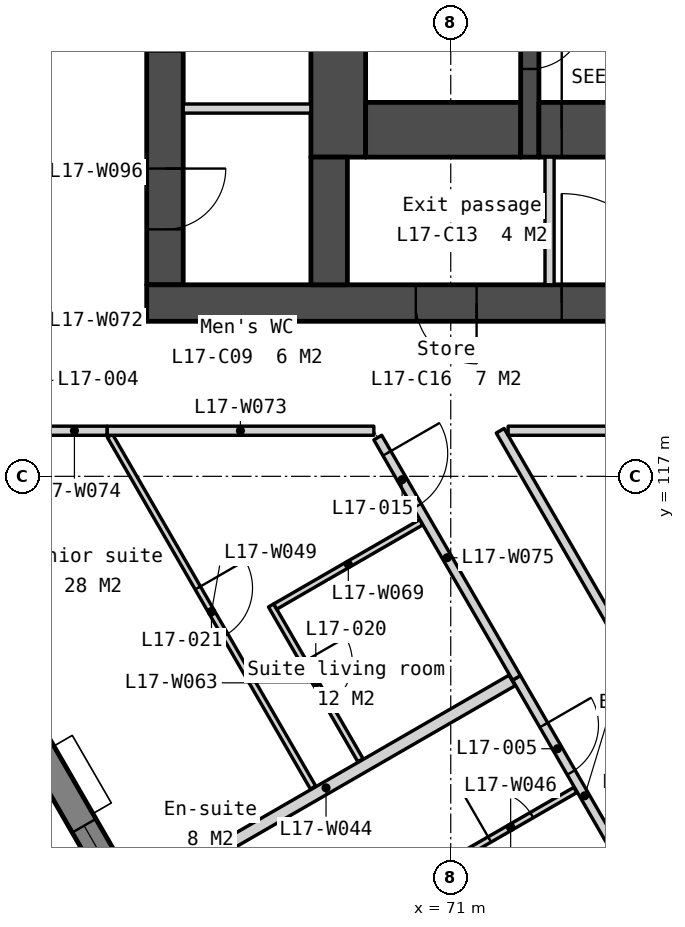
"""IFC4 building model, lengths in metres.
Left out: names, types, materials, properties, quantities, classifications, styles, units other than length and angle.
Written with IfcOpenShell. Run it as: python <this file> out.ifc"""

import sys

from ifc_helpers import new_model, si_unit, direction, frame, frame_2d, origin, place, context, subcontext, project, spatial, polyline, rectangle, outline, extrude, element, fill, save


model = new_model("IFC4")
c1 = context("Model", 3, precision=1e-05, world=origin(), true_north=direction((0.0, 1.0)))
c2 = subcontext(c1, "Body", "Model", "MODEL_VIEW")
j1 = project(units=[si_unit("LENGTHUNIT", "METRE"), si_unit("PLANEANGLEUNIT", "RADIAN")], contexts=[c1])
p1 = place(None, origin())
s1 = spatial("IfcSite", under=j1, at=p1, CompositionType="ELEMENT")
p2 = place(p1, origin())
s2 = spatial("IfcBuilding", under=s1, at=p2, CompositionType="ELEMENT")
p3 = place(p2, frame((0.0, 0.0, 73.5)))
s3 = spatial("IfcBuildingStorey", under=s2, at=p3, CompositionType="ELEMENT", Elevation=73.5)
p4 = place(p3, frame((66.3, 133.95, 0.0), z_axis=(0.0, 0.0, 1.0), x_axis=(0.0, -1.0, 0.0)))
e1 = element("IfcWall", 1, at=p4, inside=s3, PredefinedType="SOLIDWALL", context=c2, shape_type="SweptSolid", body=[
    extrude(rectangle(XDim=13.8, YDim=0.6, at=frame_2d((6.9, 0.0))), origin(), (0.0, 0.0, 1.0), 3.25),
])
p5 = place(p4, frame((0.6, 0.0, 0.0)))
e2 = element("IfcOpeningElement", 2, at=p5, cuts=e1, PredefinedType="OPENING", context=c2, shape_type="SweptSolid", body=[
    extrude(rectangle(XDim=1.1, YDim=2.1, at=frame_2d((0.55, 1.05))), frame((0.0, 0.31, 0.0), z_axis=(0.0, -1.0, 0.0), x_axis=(1.0, 0.0, 0.0)), (0.0, 0.0, 1.0), 0.62),
])
p6 = place(p4, frame((8.963, 0.0, 0.0)))
e3 = element("IfcOpeningElement", 3, at=p6, cuts=e1, PredefinedType="OPENING", context=c2, shape_type="SweptSolid", body=[
    extrude(rectangle(XDim=1.0, YDim=2.1, at=frame_2d((0.5, 1.05))), frame((0.0, 0.31, 0.0), z_axis=(0.0, -1.0, 0.0), x_axis=(1.0, 0.0, 0.0)), (0.0, 0.0, 1.0), 0.62),
])
p7 = place(p4, frame((11.888, 0.0, 0.0)))
e4 = element("IfcOpeningElement", 4, at=p7, cuts=e1, PredefinedType="OPENING", context=c2, shape_type="SweptSolid", body=[
    extrude(rectangle(XDim=1.0, YDim=2.1, at=frame_2d((0.5, 1.05))), frame((0.0, 0.31, 0.0), z_axis=(0.0, -1.0, 0.0), x_axis=(1.0, 0.0, 0.0)), (0.0, 0.0, 1.0), 0.62),
])
p8 = place(p3, frame((66.0, 119.85, 0.0), z_axis=(0.0, 0.0, 1.0), x_axis=(1.0, 0.0, 0.0)))
e5 = element("IfcWall", 5, at=p8, inside=s3, PredefinedType="SOLIDWALL", context=c2, shape_type="SweptSolid", body=[
    extrude(rectangle(XDim=28.0, YDim=0.6, at=frame_2d((14.0, 0.0))), origin(), (0.0, 0.0, 1.0), 3.25),
])
p9 = place(p8, frame((6.825, 0.0, 0.0)))
e6 = element("IfcOpeningElement", 6, at=p9, cuts=e5, PredefinedType="OPENING", context=c2, shape_type="SweptSolid", body=[
    extrude(rectangle(XDim=1.8, YDim=2.1, at=frame_2d((0.9, 1.05))), frame((0.0, 0.31, 0.0), z_axis=(0.0, -1.0, 0.0), x_axis=(1.0, 0.0, 0.0)), (0.0, 0.0, 1.0), 0.62),
])
p10 = place(p8, frame((15.85, 0.0, 0.0)))
e7 = element("IfcOpeningElement", 7, at=p10, cuts=e5, PredefinedType="OPENING", context=c2, shape_type="SweptSolid", body=[
    extrude(rectangle(XDim=1.5, YDim=2.1, at=frame_2d((0.75, 1.05))), frame((0.0, 0.31, 0.0), z_axis=(0.0, -1.0, 0.0), x_axis=(1.0, 0.0, 0.0)), (0.0, 0.0, 1.0), 0.62),
])
p11 = place(p8, frame((19.375, 0.0, 0.0)))
e8 = element("IfcOpeningElement", 8, at=p11, cuts=e5, PredefinedType="OPENING", context=c2, shape_type="SweptSolid", body=[
    extrude(rectangle(XDim=1.8, YDim=2.1, at=frame_2d((0.9, 1.05))), frame((0.0, 0.31, 0.0), z_axis=(0.0, -1.0, 0.0), x_axis=(1.0, 0.0, 0.0)), (0.0, 0.0, 1.0), 0.62),
])
p12 = place(p8, frame((4.425, 0.0, 0.0)))
e9 = element("IfcOpeningElement", 9, at=p12, cuts=e5, PredefinedType="OPENING", context=c2, shape_type="SweptSolid", body=[
    extrude(rectangle(XDim=1.0, YDim=2.1, at=frame_2d((0.5, 1.05))), frame((0.0, 0.31, 0.0), z_axis=(0.0, -1.0, 0.0), x_axis=(1.0, 0.0, 0.0)), (0.0, 0.0, 1.0), 0.62),
])
p13 = place(p8, frame((9.783, 0.0, 0.0)))
e10 = element("IfcOpeningElement", 10, at=p13, cuts=e5, PredefinedType="OPENING", context=c2, shape_type="SweptSolid", body=[
    extrude(rectangle(XDim=1.0, YDim=2.1, at=frame_2d((0.5, 1.05))), frame((0.0, 0.31, 0.0), z_axis=(0.0, -1.0, 0.0), x_axis=(1.0, 0.0, 0.0)), (0.0, 0.0, 1.0), 0.62),
])
p14 = place(p8, frame((11.525, 0.0, 0.0)))
e11 = element("IfcOpeningElement", 11, at=p14, cuts=e5, PredefinedType="OPENING", context=c2, shape_type="SweptSolid", body=[
    extrude(rectangle(XDim=1.0, YDim=2.1, at=frame_2d((0.5, 1.05))), frame((0.0, 0.31, 0.0), z_axis=(0.0, -1.0, 0.0), x_axis=(1.0, 0.0, 0.0)), (0.0, 0.0, 1.0), 0.62),
])
p15 = place(p8, frame((13.658, 0.0, 0.0)))
e12 = element("IfcOpeningElement", 12, at=p15, cuts=e5, PredefinedType="OPENING", context=c2, shape_type="SweptSolid", body=[
    extrude(rectangle(XDim=1.0, YDim=2.1, at=frame_2d((0.5, 1.05))), frame((0.0, 0.31, 0.0), z_axis=(0.0, -1.0, 0.0), x_axis=(1.0, 0.0, 0.0)), (0.0, 0.0, 1.0), 0.62),
])
p16 = place(p8, frame((22.575, 0.0, 0.0)))
e13 = element("IfcOpeningElement", 13, at=p16, cuts=e5, PredefinedType="OPENING", context=c2, shape_type="SweptSolid", body=[
    extrude(rectangle(XDim=1.0, YDim=2.1, at=frame_2d((0.5, 1.05))), frame((0.0, 0.31, 0.0), z_axis=(0.0, -1.0, 0.0), x_axis=(1.0, 0.0, 0.0)), (0.0, 0.0, 1.0), 0.62),
])
p17 = place(p3, frame((66.6, 123.049, 0.0), z_axis=(0.0, 0.0, 1.0), x_axis=(1.0, 0.0, 0.0)))
e14 = element("IfcWall", 14, at=p17, inside=s3, PredefinedType="PARTITIONING", context=c2, shape_type="SweptSolid", body=[
    extrude(rectangle(XDim=2.1, YDim=0.15, at=frame_2d((1.05, 0.0))), origin(), (0.0, 0.0, 1.0), 3.25),
])
p18 = place(p3, frame((69.15, 133.95, 0.0), z_axis=(0.0, 0.0, 1.0), x_axis=(0.0, -1.0, 0.0)))
e15 = element("IfcWall", 15, at=p18, inside=s3, PredefinedType="SOLIDWALL", context=c2, shape_type="SweptSolid", body=[
    extrude(rectangle(XDim=11.7, YDim=0.9, at=frame_2d((5.85, 0.0))), origin(), (0.0, 0.0, 1.0), 3.25),
])
p19 = place(p3, frame((69.0, 122.25, 0.0), z_axis=(0.0, 0.0, 1.0), x_axis=(0.0, -1.0, 0.0)))
e16 = element("IfcWall", 16, at=p19, inside=s3, PredefinedType="SOLIDWALL", context=c2, shape_type="SweptSolid", body=[
    extrude(rectangle(XDim=2.1, YDim=0.6, at=frame_2d((1.05, 0.0))), origin(), (0.0, 0.0, 1.0), 3.25),
])
p20 = place(p3, frame((69.6, 122.7, 0.0), z_axis=(0.0, 0.0, 1.0), x_axis=(1.0, 0.0, 0.0)))
e17 = element("IfcWall", 17, at=p20, inside=s3, PredefinedType="SOLIDWALL", context=c2, shape_type="SweptSolid", body=[
    extrude(rectangle(XDim=2.55, YDim=0.9, at=frame_2d((1.275, 0.0))), origin(), (0.0, 0.0, 1.0), 3.25),
])
p21 = place(p3, frame((72.3, 133.95, 0.0), z_axis=(0.0, 0.0, 1.0), x_axis=(0.0, -1.0, 0.0)))
e18 = element("IfcWall", 18, at=p21, inside=s3, PredefinedType="SOLIDWALL", context=c2, shape_type="SweptSolid", body=[
    extrude(rectangle(XDim=11.7, YDim=0.3, at=frame_2d((5.85, 0.0))), origin(), (0.0, 0.0, 1.0), 3.25),
])
p22 = place(p21, frame((6.95, 0.0, 0.0)))
e19 = element("IfcOpeningElement", 19, at=p22, cuts=e18, PredefinedType="OPENING", context=c2, shape_type="SweptSolid", body=[
    extrude(rectangle(XDim=1.1, YDim=2.1, at=frame_2d((0.55, 1.05))), frame((0.0, 0.16, 0.0), z_axis=(0.0, -1.0, 0.0), x_axis=(1.0, 0.0, 0.0)), (0.0, 0.0, 1.0), 0.32),
])
p23 = place(p21, frame((9.35, 0.0, 0.0)))
e20 = element("IfcOpeningElement", 20, at=p23, cuts=e18, PredefinedType="OPENING", context=c2, shape_type="SweptSolid", body=[
    extrude(rectangle(XDim=0.9, YDim=2.1, at=frame_2d((0.45, 1.05))), frame((0.0, 0.16, 0.0), z_axis=(0.0, -1.0, 0.0), x_axis=(1.0, 0.0, 0.0)), (0.0, 0.0, 1.0), 0.32),
])
p24 = place(p21, frame((5.1, 0.0, 0.0)))
e21 = element("IfcOpeningElement", 21, at=p24, cuts=e18, PredefinedType="OPENING", context=c2, shape_type="SweptSolid", body=[
    extrude(rectangle(XDim=1.0, YDim=2.1, at=frame_2d((0.5, 1.05))), frame((0.0, 0.16, 0.0), z_axis=(0.0, -1.0, 0.0), x_axis=(1.0, 0.0, 0.0)), (0.0, 0.0, 1.0), 0.32),
])
p25 = place(p3, frame((72.45, 122.7, 0.0), z_axis=(0.0, 0.0, 1.0), x_axis=(1.0, 0.0, 0.0)))
e22 = element("IfcWall", 22, at=p25, inside=s3, PredefinedType="SOLIDWALL", context=c2, shape_type="SweptSolid", body=[
    extrude(rectangle(XDim=2.55, YDim=0.9, at=frame_2d((1.275, 0.0))), origin(), (0.0, 0.0, 1.0), 3.25),
])
p26 = place(p25, frame((0.375, 0.0, 0.0)))
e23 = element("IfcOpeningElement", 23, at=p26, cuts=e22, PredefinedType="OPENING", context=c2, shape_type="SweptSolid", body=[
    extrude(rectangle(XDim=1.8, YDim=2.1, at=frame_2d((0.9, 1.05))), frame((0.0, 0.46, 0.0), z_axis=(0.0, -1.0, 0.0), x_axis=(1.0, 0.0, 0.0)), (0.0, 0.0, 1.0), 0.92),
])
p27 = place(p3, frame((72.625, 122.25, 0.0), z_axis=(0.0, 0.0, 1.0), x_axis=(0.0, -1.0, 0.0)))
e24 = element("IfcWall", 24, at=p27, inside=s3, PredefinedType="PARTITIONING", context=c2, shape_type="SweptSolid", body=[
    extrude(rectangle(XDim=2.1, YDim=0.15, at=frame_2d((1.05, 0.0))), origin(), (0.0, 0.0, 1.0), 3.25),
])
p28 = place(p3, frame((54.495, 129.397, -0.15), z_axis=(0.0, 0.0, 1.0), x_axis=(0.499999201451, -0.866025864826, 0.0)))
e25 = element("IfcWall", 25, at=p28, inside=s3, PredefinedType="SOLIDWALL", context=c2, shape_type="SweptSolid", body=[
    extrude(outline(polyline([(44.8, 0.0), (44.8, 3.4), (0.0, 3.4), (0.0, 0.0), (44.8, 0.0)])), frame((0.0, 0.225, 0.0), z_axis=(0.0, -1.0, 0.0), x_axis=(1.0, 0.0, 0.0)), (0.0, 0.0, 1.0), 0.45),
])
p29 = place(p28, frame((3.03, 0.0, 1.05)))
e26 = element("IfcOpeningElement", 26, at=p29, cuts=e25, PredefinedType="OPENING", context=c2, shape_type="SweptSolid", body=[
    extrude(rectangle(XDim=1.2, YDim=1.5, at=frame_2d((0.6, 0.75))), frame((0.0, 0.235, 0.0), z_axis=(0.0, -1.0, 0.0), x_axis=(1.0, 0.0, 0.0)), (0.0, 0.0, 1.0), 0.47),
])
p30 = place(p28, frame((4.73, 0.0, 1.05)))
e27 = element("IfcOpeningElement", 27, at=p30, cuts=e25, PredefinedType="OPENING", context=c2, shape_type="SweptSolid", body=[
    extrude(rectangle(XDim=1.2, YDim=1.5, at=frame_2d((0.6, 0.75))), frame((0.0, 0.235, 0.0), z_axis=(0.0, -1.0, 0.0), x_axis=(1.0, 0.0, 0.0)), (0.0, 0.0, 1.0), 0.47),
])
p31 = place(p28, frame((11.99, 0.0, 1.05)))
e28 = element("IfcOpeningElement", 28, at=p31, cuts=e25, PredefinedType="OPENING", context=c2, shape_type="SweptSolid", body=[
    extrude(rectangle(XDim=1.2, YDim=1.5, at=frame_2d((0.6, 0.75))), frame((0.0, 0.235, 0.0), z_axis=(0.0, -1.0, 0.0), x_axis=(1.0, 0.0, 0.0)), (0.0, 0.0, 1.0), 0.47),
])
p32 = place(p28, frame((13.69, 0.0, 1.05)))
e29 = element("IfcOpeningElement", 29, at=p32, cuts=e25, PredefinedType="OPENING", context=c2, shape_type="SweptSolid", body=[
    extrude(rectangle(XDim=1.2, YDim=1.5, at=frame_2d((0.6, 0.75))), frame((0.0, 0.235, 0.0), z_axis=(0.0, -1.0, 0.0), x_axis=(1.0, 0.0, 0.0)), (0.0, 0.0, 1.0), 0.47),
])
p33 = place(p28, frame((20.95, 0.0, 1.05)))
e30 = element("IfcOpeningElement", 30, at=p33, cuts=e25, PredefinedType="OPENING", context=c2, shape_type="SweptSolid", body=[
    extrude(rectangle(XDim=1.2, YDim=1.5, at=frame_2d((0.6, 0.75))), frame((0.0, 0.235, 0.0), z_axis=(0.0, -1.0, 0.0), x_axis=(1.0, 0.0, 0.0)), (0.0, 0.0, 1.0), 0.47),
])
p34 = place(p28, frame((22.65, 0.0, 1.05)))
e31 = element("IfcOpeningElement", 31, at=p34, cuts=e25, PredefinedType="OPENING", context=c2, shape_type="SweptSolid", body=[
    extrude(rectangle(XDim=1.2, YDim=1.5, at=frame_2d((0.6, 0.75))), frame((0.0, 0.235, 0.0), z_axis=(0.0, -1.0, 0.0), x_axis=(1.0, 0.0, 0.0)), (0.0, 0.0, 1.0), 0.47),
])
p35 = place(p28, frame((29.91, 0.0, 1.05)))
e32 = element("IfcOpeningElement", 32, at=p35, cuts=e25, PredefinedType="OPENING", context=c2, shape_type="SweptSolid", body=[
    extrude(rectangle(XDim=1.2, YDim=1.5, at=frame_2d((0.6, 0.75))), frame((0.0, 0.235, 0.0), z_axis=(0.0, -1.0, 0.0), x_axis=(1.0, 0.0, 0.0)), (0.0, 0.0, 1.0), 0.47),
])
p36 = place(p28, frame((31.61, 0.0, 1.05)))
e33 = element("IfcOpeningElement", 33, at=p36, cuts=e25, PredefinedType="OPENING", context=c2, shape_type="SweptSolid", body=[
    extrude(rectangle(XDim=1.2, YDim=1.5, at=frame_2d((0.6, 0.75))), frame((0.0, 0.235, 0.0), z_axis=(0.0, -1.0, 0.0), x_axis=(1.0, 0.0, 0.0)), (0.0, 0.0, 1.0), 0.47),
])
p37 = place(p28, frame((38.87, 0.0, 1.05)))
e34 = element("IfcOpeningElement", 34, at=p37, cuts=e25, PredefinedType="OPENING", context=c2, shape_type="SweptSolid", body=[
    extrude(rectangle(XDim=1.2, YDim=1.5, at=frame_2d((0.6, 0.75))), frame((0.0, 0.235, 0.0), z_axis=(0.0, -1.0, 0.0), x_axis=(1.0, 0.0, 0.0)), (0.0, 0.0, 1.0), 0.47),
])
p38 = place(p28, frame((40.57, 0.0, 1.05)))
e35 = element("IfcOpeningElement", 35, at=p38, cuts=e25, PredefinedType="OPENING", context=c2, shape_type="SweptSolid", body=[
    extrude(rectangle(XDim=1.2, YDim=1.5, at=frame_2d((0.6, 0.75))), frame((0.0, 0.235, 0.0), z_axis=(0.0, -1.0, 0.0), x_axis=(1.0, 0.0, 0.0)), (0.0, 0.0, 1.0), 0.47),
])
p39 = place(p3, frame((72.082, 113.685, 0.0), z_axis=(0.0, 0.0, 1.0), x_axis=(0.499989762656, -0.866031314237, 0.0)))
e36 = element("IfcWall", 36, at=p39, inside=s3, PredefinedType="PARTITIONING", context=c2, shape_type="SweptSolid", body=[
    extrude(rectangle(XDim=4.48, YDim=0.15, at=frame_2d((2.24, 0.0))), origin(), (0.0, 0.0, 1.0), 3.25),
])
p40 = place(p39, frame((0.896, 0.0, 0.0)))
e37 = element("IfcOpeningElement", 37, at=p40, cuts=e36, PredefinedType="OPENING", context=c2, shape_type="SweptSolid", body=[
    extrude(rectangle(XDim=0.9, YDim=2.1, at=frame_2d((0.45, 1.05))), frame((0.0, 0.085, 0.0), z_axis=(0.0, -1.0, 0.0), x_axis=(1.0, 0.0, 0.0)), (0.0, 0.0, 1.0), 0.17),
])
p41 = place(p3, frame((65.89, 110.11, 0.0), z_axis=(0.0, 0.0, 1.0), x_axis=(0.866033669941, 0.499985682323, 0.0)))
e38 = element("IfcWall", 38, at=p41, inside=s3, PredefinedType="PARTITIONING", context=c2, shape_type="SweptSolid", body=[
    extrude(rectangle(XDim=7.065, YDim=0.2, at=frame_2d((3.533, 0.0))), origin(), (0.0, 0.0, 1.0), 3.25),
])
p42 = place(p3, frame((70.922, 110.614, 0.0), z_axis=(0.0, 0.0, 1.0), x_axis=(0.866049783786, 0.499957770222, 0.0)))
e39 = element("IfcWall", 39, at=p42, inside=s3, PredefinedType="PARTITIONING", context=c2, shape_type="SweptSolid", body=[
    extrude(rectangle(XDim=2.455, YDim=0.1, at=frame_2d((1.228, 0.0))), origin(), (0.0, 0.0, 1.0), 3.25),
])
p43 = place(p42, frame((0.827, 0.0, 0.0)))
e40 = element("IfcOpeningElement", 40, at=p43, cuts=e39, PredefinedType="OPENING", context=c2, shape_type="SweptSolid", body=[
    extrude(rectangle(XDim=0.8, YDim=2.1, at=frame_2d((0.4, 1.05))), frame((0.0, 0.06, 0.0), z_axis=(0.0, -1.0, 0.0), x_axis=(1.0, 0.0, 0.0)), (0.0, 0.0, 1.0), 0.12),
])
p44 = place(p3, frame((65.395, 117.668, 0.0), z_axis=(0.0, 0.0, 1.0), x_axis=(0.499986003774, -0.866033484359, 0.0)))
e41 = element("IfcWall", 41, at=p44, inside=s3, PredefinedType="PARTITIONING", context=c2, shape_type="SweptSolid", body=[
    extrude(rectangle(XDim=6.682, YDim=0.1, at=frame_2d((3.341, 0.0))), origin(), (0.0, 0.0, 1.0), 3.25),
])
p45 = place(p44, frame((2.891, 0.0, 0.0)))
e42 = element("IfcOpeningElement", 42, at=p45, cuts=e41, PredefinedType="OPENING", context=c2, shape_type="SweptSolid", body=[
    extrude(rectangle(XDim=0.9, YDim=2.1, at=frame_2d((0.45, 1.05))), frame((0.0, 0.06, 0.0), z_axis=(0.0, -1.0, 0.0), x_axis=(1.0, 0.0, 0.0)), (0.0, 0.0, 1.0), 0.12),
])
p46 = place(p3, frame((68.045, 114.877, 0.0), z_axis=(0.0, 0.0, 1.0), x_axis=(0.499988418424, -0.866032090307, 0.0)))
e43 = element("IfcWall", 43, at=p46, inside=s3, PredefinedType="PARTITIONING", context=c2, shape_type="SweptSolid", body=[
    extrude(rectangle(XDim=2.94, YDim=0.1, at=frame_2d((1.47, 0.0))), origin(), (0.0, 0.0, 1.0), 3.25),
])
p47 = place(p46, frame((1.07, 0.0, 0.0)))
e44 = element("IfcOpeningElement", 44, at=p47, cuts=e43, PredefinedType="OPENING", context=c2, shape_type="SweptSolid", body=[
    extrude(rectangle(XDim=0.8, YDim=2.1, at=frame_2d((0.4, 1.05))), frame((0.0, 0.06, 0.0), z_axis=(0.0, -1.0, 0.0), x_axis=(1.0, 0.0, 0.0)), (0.0, 0.0, 1.0), 0.12),
])
p48 = place(p3, frame((68.114, 114.858, 0.0), z_axis=(0.0, 0.0, 1.0), x_axis=(0.866042014628, 0.499971228071, 0.0)))
e45 = element("IfcWall", 45, at=p48, inside=s3, PredefinedType="PARTITIONING", context=c2, shape_type="SweptSolid", body=[
    extrude(rectangle(XDim=2.775, YDim=0.1, at=frame_2d((1.388, 0.0))), origin(), (0.0, 0.0, 1.0), 3.25),
])
p49 = place(p3, frame((65.347, 117.75, 0.0), z_axis=(0.0, 0.0, 1.0), x_axis=(1.0, 0.0, 0.0)))
e46 = element("IfcWall", 46, at=p49, inside=s3, PredefinedType="PARTITIONING", context=c2, shape_type="SweptSolid", body=[
    extrude(rectangle(XDim=4.388, YDim=0.15, at=frame_2d((2.194, 0.0))), origin(), (0.0, 0.0, 1.0), 3.25),
])
p50 = place(p3, frame((64.275, 117.75, 0.0), z_axis=(0.0, 0.0, 1.0), x_axis=(1.0, 0.0, 0.0)))
e47 = element("IfcWall", 47, at=p50, inside=s3, PredefinedType="PARTITIONING", context=c2, shape_type="SweptSolid", body=[
    extrude(rectangle(XDim=1.072, YDim=0.15, at=frame_2d((0.536, 0.0))), origin(), (0.0, 0.0, 1.0), 3.25),
])
p51 = place(p3, frame((69.8, 117.637, 0.0), z_axis=(0.0, 0.0, 1.0), x_axis=(0.499994135611, -0.866028789565, 0.0)))
e48 = element("IfcWall", 48, at=p51, inside=s3, PredefinedType="PARTITIONING", context=c2, shape_type="SweptSolid", body=[
    extrude(rectangle(XDim=4.563, YDim=0.15, at=frame_2d((2.282, 0.0))), origin(), (0.0, 0.0, 1.0), 3.25),
])
p52 = place(p51, frame((0.3, 0.0, 0.0)))
e49 = element("IfcOpeningElement", 49, at=p52, cuts=e48, PredefinedType="OPENING", context=c2, shape_type="SweptSolid", body=[
    extrude(rectangle(XDim=1.0, YDim=2.1, at=frame_2d((0.5, 1.05))), frame((0.0, 0.085, 0.0), z_axis=(0.0, -1.0, 0.0), x_axis=(1.0, 0.0, 0.0)), (0.0, 0.0, 1.0), 0.17),
])
p53 = place(p3, frame((71.813, 117.75, 0.0), z_axis=(0.0, 0.0, 1.0), x_axis=(0.500004357924, -0.866022887721, 0.0)))
e50 = element("IfcWall", 50, at=p53, inside=s3, PredefinedType="PARTITIONING", context=c2, shape_type="SweptSolid", body=[
    extrude(rectangle(XDim=13.369, YDim=0.15, at=frame_2d((6.685, 0.0))), origin(), (0.0, 0.0, 1.0), 3.25),
])
p54 = place(p53, frame((6.235, 0.0, 0.0)))
e51 = element("IfcOpeningElement", 51, at=p54, cuts=e50, PredefinedType="OPENING", context=c2, shape_type="SweptSolid", body=[
    extrude(rectangle(XDim=0.9, YDim=2.1, at=frame_2d((0.45, 1.05))), frame((0.0, 0.085, 0.0), z_axis=(0.0, -1.0, 0.0), x_axis=(1.0, 0.0, 0.0)), (0.0, 0.0, 1.0), 0.17),
])
p55 = place(p3, frame((71.943, 117.75, 0.0), z_axis=(0.0, 0.0, 1.0), x_axis=(1.0, 0.0, 0.0)))
e52 = element("IfcWall", 52, at=p55, inside=s3, PredefinedType="PARTITIONING", context=c2, shape_type="SweptSolid", body=[
    extrude(rectangle(XDim=6.555, YDim=0.15, at=frame_2d((3.277, 0.0))), origin(), (0.0, 0.0, 1.0), 3.25),
])
p56 = place(p26, origin())
e53 = element("IfcDoor", 53, at=p56, inside=s3, OperationType="DOUBLE_DOOR_DOUBLE_SWING", PredefinedType="DOOR", context=c2, shape_type="SweptSolid", body=[
    extrude(rectangle(XDim=1.8, YDim=2.1, at=frame_2d((0.9, 1.05))), frame((0.0, 0.025, 0.0), z_axis=(0.0, -1.0, 0.0), x_axis=(1.0, 0.0, 0.0)), (0.0, 0.0, 1.0), 0.05),
])
fill(e23, e53)
p57 = place(p9, origin())
e54 = element("IfcDoor", 54, at=p57, inside=s3, OperationType="DOUBLE_DOOR_DOUBLE_SWING", PredefinedType="DOOR", context=c2, shape_type="SweptSolid", body=[
    extrude(rectangle(XDim=1.8, YDim=2.1, at=frame_2d((0.9, 1.05))), frame((0.0, 0.025, 0.0), z_axis=(0.0, -1.0, 0.0), x_axis=(1.0, 0.0, 0.0)), (0.0, 0.0, 1.0), 0.05),
])
fill(e6, e54)
p58 = place(p23, origin())
e55 = element("IfcDoor", 55, at=p58, inside=s3, OperationType="SINGLE_SWING_LEFT", PredefinedType="DOOR", context=c2, shape_type="SweptSolid", body=[
    extrude(rectangle(XDim=0.9, YDim=2.1, at=frame_2d((0.45, 1.05))), frame((0.0, 0.025, 0.0), z_axis=(0.0, -1.0, 0.0), x_axis=(1.0, 0.0, 0.0)), (0.0, 0.0, 1.0), 0.05),
])
fill(e20, e55)
p59 = place(p12, origin())
e56 = element("IfcDoor", 56, at=p59, inside=s3, OperationType="SINGLE_SWING_RIGHT", PredefinedType="DOOR", context=c2, shape_type="SweptSolid", body=[
    extrude(rectangle(XDim=1.0, YDim=2.1, at=frame_2d((0.5, 1.05))), frame((0.0, 0.025, 0.0), z_axis=(0.0, -1.0, 0.0), x_axis=(1.0, 0.0, 0.0)), (0.0, 0.0, 1.0), 0.05),
])
fill(e9, e56)
p60 = place(p7, origin())
e57 = element("IfcDoor", 57, at=p60, inside=s3, OperationType="SINGLE_SWING_LEFT", PredefinedType="DOOR", context=c2, shape_type="SweptSolid", body=[
    extrude(rectangle(XDim=1.0, YDim=2.1, at=frame_2d((0.5, 1.05))), frame((0.0, 0.025, 0.0), z_axis=(0.0, -1.0, 0.0), x_axis=(1.0, 0.0, 0.0)), (0.0, 0.0, 1.0), 0.05),
])
fill(e4, e57)
p61 = place(p33, origin())
e58 = element("IfcWindow", 58, at=p61, inside=s3, PartitioningType="SINGLE_PANEL", PredefinedType="WINDOW", context=c2, shape_type="SweptSolid", body=[
    extrude(rectangle(XDim=1.2, YDim=1.5, at=frame_2d((0.6, 0.75))), frame((0.0, 0.03, 0.0), z_axis=(0.0, -1.0, 0.0), x_axis=(1.0, 0.0, 0.0)), (0.0, 0.0, 1.0), 0.06),
])
fill(e30, e58)
p62 = place(p40, origin())
e59 = element("IfcDoor", 59, at=p62, inside=s3, OperationType="SINGLE_SWING_LEFT", PredefinedType="DOOR", context=c2, shape_type="SweptSolid", body=[
    extrude(rectangle(XDim=0.9, YDim=2.1, at=frame_2d((0.45, 1.05))), frame((0.0, 0.025, 0.0), z_axis=(0.0, -1.0, 0.0), x_axis=(1.0, 0.0, 0.0)), (0.0, 0.0, 1.0), 0.05),
])
fill(e37, e59)
p63 = place(p52, origin())
e60 = element("IfcDoor", 60, at=p63, inside=s3, OperationType="SINGLE_SWING_LEFT", PredefinedType="DOOR", context=c2, shape_type="SweptSolid", body=[
    extrude(rectangle(XDim=1.0, YDim=2.1, at=frame_2d((0.5, 1.05))), frame((0.0, 0.025, 0.0), z_axis=(0.0, -1.0, 0.0), x_axis=(1.0, 0.0, 0.0)), (0.0, 0.0, 1.0), 0.05),
])
fill(e49, e60)
p64 = place(p47, origin())
e61 = element("IfcDoor", 61, at=p64, inside=s3, OperationType="SINGLE_SWING_LEFT", PredefinedType="DOOR", context=c2, shape_type="SweptSolid", body=[
    extrude(rectangle(XDim=0.8, YDim=2.1, at=frame_2d((0.4, 1.05))), frame((0.0, 0.025, 0.0), z_axis=(0.0, -1.0, 0.0), x_axis=(1.0, 0.0, 0.0)), (0.0, 0.0, 1.0), 0.05),
])
fill(e44, e61)
p65 = place(p45, origin())
e62 = element("IfcDoor", 62, at=p65, inside=s3, OperationType="SINGLE_SWING_LEFT", PredefinedType="DOOR", context=c2, shape_type="SweptSolid", body=[
    extrude(rectangle(XDim=0.9, YDim=2.1, at=frame_2d((0.45, 1.05))), frame((0.0, 0.025, 0.0), z_axis=(0.0, -1.0, 0.0), x_axis=(1.0, 0.0, 0.0)), (0.0, 0.0, 1.0), 0.05),
])
fill(e42, e62)
p66 = place(p43, origin())
e63 = element("IfcDoor", 63, at=p66, inside=s3, OperationType="SINGLE_SWING_LEFT", PredefinedType="DOOR", context=c2, shape_type="SweptSolid", body=[
    extrude(rectangle(XDim=0.8, YDim=2.1, at=frame_2d((0.4, 1.05))), frame((0.0, 0.025, 0.0), z_axis=(0.0, -1.0, 0.0), x_axis=(1.0, 0.0, 0.0)), (0.0, 0.0, 1.0), 0.05),
])
fill(e40, e63)
save(model, sys.argv[1])
